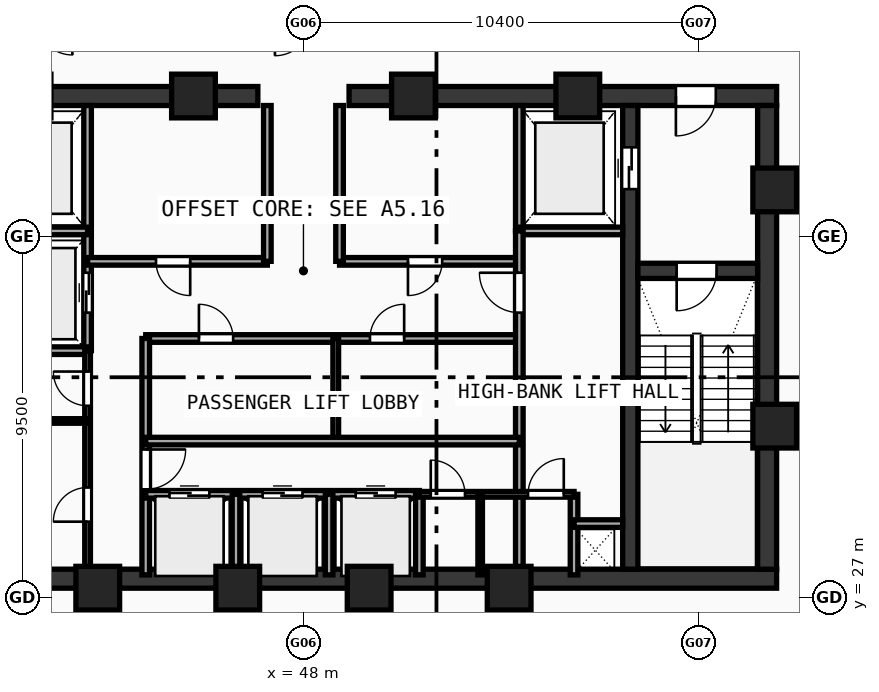
"""IFC4 building model, lengths in metres.
Left out: names, types, materials, properties, quantities, classifications, styles, units other than length and angle.
Written with IfcOpenShell. Run it as: python <this file> out.ifc"""

import sys

from ifc_helpers import new_model, si_unit, direction, frame, frame_2d, origin, origin_with_axes, origin_2d, place, context, subcontext, project, spatial, rectangle, hollow_rectangle, extrude, source, transform, mapped, element, fill, save


model = new_model("IFC4")
c1 = context("Model", 3, precision=1e-05, world=origin(), true_north=direction((0.0, 1.0)))
c2 = subcontext(c1, "Body", "Model", "MODEL_VIEW")
j1 = project(units=[si_unit("LENGTHUNIT", "METRE"), si_unit("PLANEANGLEUNIT", "RADIAN")], contexts=[c1])
p1 = place(None, origin())
s1 = spatial("IfcSite", under=j1, at=p1, CompositionType="ELEMENT")
p2 = place(p1, origin())
s2 = spatial("IfcBuilding", under=s1, at=p2, CompositionType="ELEMENT")
p3 = place(p2, frame((0.0, 0.0, 240.8)))
s3 = spatial("IfcBuildingStorey", under=s2, at=p3, CompositionType="ELEMENT", Elevation=240.8)
p4 = place(p3, frame((35.55, 27.5, 0.0), z_axis=(0.0, 0.0, 1.0), x_axis=(1.0, 0.0, 0.0)))
e1 = element("IfcWall", 1, at=p4, inside=s3, PredefinedType="SHEAR", context=c2, shape_type="SweptSolid", body=[
    extrude(rectangle(XDim=24.9, YDim=0.5, at=frame_2d((12.45, 0.0))), origin(), (0.0, 0.0, 1.0), 3.47),
])
p5 = place(p3, frame((35.55, 40.2, 0.0), z_axis=(0.0, 0.0, 1.0), x_axis=(1.0, 0.0, 0.0)))
e2 = element("IfcWall", 2, at=p5, inside=s3, PredefinedType="SHEAR", context=c2, shape_type="SweptSolid", body=[
    extrude(rectangle(XDim=11.25, YDim=0.5, at=frame_2d((5.625, 0.0))), origin(), (0.0, 0.0, 1.0), 3.47),
])
p6 = place(p5, frame((1.6, 0.0, 0.0)))
e3 = element("IfcOpeningElement", 3, at=p6, cuts=e2, PredefinedType="OPENING", context=c2, shape_type="SweptSolid", body=[
    extrude(rectangle(XDim=1.05, YDim=2.1, at=frame_2d((0.525, 1.05))), frame((0.0, 0.26, 0.0), z_axis=(0.0, -1.0, 0.0), x_axis=(1.0, 0.0, 0.0)), (0.0, 0.0, 1.0), 0.52),
])
p7 = place(p3, frame((49.2, 40.2, 0.0), z_axis=(0.0, 0.0, 1.0), x_axis=(1.0, 0.0, 0.0)))
e4 = element("IfcWall", 4, at=p7, inside=s3, PredefinedType="SHEAR", context=c2, shape_type="SweptSolid", body=[
    extrude(rectangle(XDim=11.25, YDim=0.5, at=frame_2d((5.625, 0.0))), origin(), (0.0, 0.0, 1.0), 3.47),
])
p8 = place(p7, frame((8.6, 0.0, 0.0)))
e5 = element("IfcOpeningElement", 5, at=p8, cuts=e4, PredefinedType="OPENING", context=c2, shape_type="SweptSolid", body=[
    extrude(rectangle(XDim=1.05, YDim=2.1, at=frame_2d((0.525, 1.05))), frame((0.0, 0.26, 0.0), z_axis=(0.0, -1.0, 0.0), x_axis=(1.0, 0.0, 0.0)), (0.0, 0.0, 1.0), 0.52),
])
p9 = place(p3, frame((60.2, 27.75, 0.0), z_axis=(0.0, 0.0, 1.0), x_axis=(0.0, 1.0, 0.0)))
e6 = element("IfcWall", 6, at=p9, inside=s3, PredefinedType="SHEAR", context=c2, shape_type="SweptSolid", body=[
    extrude(rectangle(XDim=12.2, YDim=0.5, at=frame_2d((6.1, 0.0))), origin(), (0.0, 0.0, 1.0), 3.47),
])
p10 = place(p3, frame((56.6, 27.75, 0.0), z_axis=(0.0, 0.0, 1.0), x_axis=(0.0, 1.0, 0.0)))
e7 = element("IfcWall", 7, at=p10, inside=s3, PredefinedType="SHEAR", context=c2, shape_type="SweptSolid", body=[
    extrude(rectangle(XDim=12.2, YDim=0.4, at=frame_2d((6.1, 0.0))), origin(), (0.0, 0.0, 1.0), 3.47),
])
p11 = place(p10, frame((10.0, 0.0, 0.0)))
e8 = element("IfcOpeningElement", 8, at=p11, cuts=e7, PredefinedType="OPENING", context=c2, shape_type="SweptSolid", body=[
    extrude(rectangle(XDim=1.1, YDim=2.1, at=frame_2d((0.55, 1.05))), frame((0.0, 0.21, 0.0), z_axis=(0.0, -1.0, 0.0), x_axis=(1.0, 0.0, 0.0)), (0.0, 0.0, 1.0), 0.42),
])
p12 = place(p3, frame((56.8, 35.6, 0.0), z_axis=(0.0, 0.0, 1.0), x_axis=(1.0, 0.0, 0.0)))
e9 = element("IfcWall", 9, at=p12, inside=s3, PredefinedType="SHEAR", context=c2, shape_type="SweptSolid", body=[
    extrude(rectangle(XDim=3.15, YDim=0.4, at=frame_2d((1.575, 0.0))), origin(), (0.0, 0.0, 1.0), 3.47),
])
p13 = place(p12, frame((1.02, 0.0, 0.0)))
e10 = element("IfcOpeningElement", 10, at=p13, cuts=e9, PredefinedType="OPENING", context=c2, shape_type="SweptSolid", body=[
    extrude(rectangle(XDim=1.05, YDim=2.1, at=frame_2d((0.525, 1.05))), frame((0.0, 0.21, 0.0), z_axis=(0.0, -1.0, 0.0), x_axis=(1.0, 0.0, 0.0)), (0.0, 0.0, 1.0), 0.42),
])
m1 = source(origin(), c2, "Body", "SweptSolid", [
    extrude(hollow_rectangle(XDim=1.15, YDim=1.15, WallThickness=0.048, at=origin_2d()), origin(), (0.0, 0.0, 1.0), 3.73),
])
for number, where, z_axis, x_axis in (
    (11, (42.588, 27.25, -0.26), (0.0, 0.0, 1.0), (1.0, 0.0, 0.0)),
    (12, (46.272, 27.25, -0.26), (0.0, 0.0, 1.0), (1.0, 0.0, 0.0)),
    (13, (49.729, 27.25, -0.26), (0.0, 0.0, 1.0), (1.0, 0.0, 0.0)),
    (14, (53.412, 27.25, -0.26), (0.0, 0.0, 1.0), (1.0, 0.0, 0.0)),
    (15, (60.4, 31.513, -0.26), (0.0, 0.0, 1.0), (1.0, 0.0, 0.0)),
    (16, (60.4, 37.729, -0.26), (0.0, 0.0, 1.0), (1.0, 0.0, 0.0)),
    (17, (55.219, 40.2, -0.26), (0.0, 0.0, 1.0), (1.0, 0.0, 0.0)),
    (18, (50.894, 40.2, -0.26), (0.0, 0.0, 1.0), (1.0, 0.0, 0.0)),
    (19, (45.106, 40.2, -0.26), (0.0, 0.0, 1.0), (1.0, 0.0, 0.0)),
):
    element("IfcColumn", number, at=place(p3, frame(where, z_axis=z_axis, x_axis=x_axis)), inside=s3, PredefinedType="COLUMN", context=c2, shape_type="MappedRepresentation", body=[
        mapped(m1, transform((0.0, 0.0, 0.0), scale=1.0)),
    ])
p14 = place(p3, frame((42.32, 33.5, 0.0), z_axis=(0.0, 0.0, 1.0), x_axis=(0.0, 1.0, 0.0)))
e20 = element("IfcWall", 20, at=p14, inside=s3, PredefinedType="SOLIDWALL", context=c2, shape_type="SweptSolid", body=[
    extrude(rectangle(XDim=6.45, YDim=0.2, at=frame_2d((3.225, 0.0))), origin(), (0.0, 0.0, 1.0), 3.47),
])
p15 = place(p14, frame((1.0, 0.0, 0.0)))
e21 = element("IfcOpeningElement", 21, at=p15, cuts=e20, PredefinedType="OPENING", context=c2, shape_type="SweptSolid", body=[
    extrude(rectangle(XDim=1.05, YDim=2.1, at=frame_2d((0.525, 1.05))), frame((0.0, 0.11, 0.0), z_axis=(0.0, -1.0, 0.0), x_axis=(1.0, 0.0, 0.0)), (0.0, 0.0, 1.0), 0.22),
])
for number, where, z_axis, x_axis in (
    (22, (39.6, 36.65, 0.0), (0.0, 0.0, 1.0), (1.0, 0.0, 0.0)),
    (23, (39.6, 33.5, 0.0), (0.0, 0.0, 1.0), (1.0, 0.0, 0.0)),
):
    element("IfcWall", number, at=place(p3, frame(where, z_axis=z_axis, x_axis=x_axis)), inside=s3, PredefinedType="SOLIDWALL", context=c2, shape_type="SweptSolid", body=[
        extrude(rectangle(XDim=2.72, YDim=0.2, at=frame_2d((1.36, 0.0))), origin(), (0.0, 0.0, 1.0), 3.47),
    ])
p16 = place(p3, frame((53.68, 36.65, 0.0), z_axis=(0.0, 0.0, 1.0), x_axis=(0.0, 1.0, 0.0)))
e24 = element("IfcWall", 24, at=p16, inside=s3, PredefinedType="SOLIDWALL", context=c2, shape_type="SweptSolid", body=[
    extrude(rectangle(XDim=3.3, YDim=0.2, at=frame_2d((1.65, 0.0))), origin(), (0.0, 0.0, 1.0), 3.47),
])
p17 = place(p3, frame((53.68, 36.65, 0.0), z_axis=(0.0, 0.0, 1.0), x_axis=(1.0, 0.0, 0.0)))
e25 = element("IfcWall", 25, at=p17, inside=s3, PredefinedType="SOLIDWALL", context=c2, shape_type="SweptSolid", body=[
    extrude(rectangle(XDim=2.72, YDim=0.2, at=frame_2d((1.36, 0.0))), origin(), (0.0, 0.0, 1.0), 3.47),
])
p18 = place(p3, frame((42.32, 35.85, 0.0), z_axis=(0.0, 0.0, 1.0), x_axis=(1.0, 0.0, 0.0)))
e26 = element("IfcWall", 26, at=p18, inside=s3, PredefinedType="SOLIDWALL", context=c2, shape_type="SweptSolid", body=[
    extrude(rectangle(XDim=4.73, YDim=0.2, at=frame_2d((2.365, 0.0))), origin(), (0.0, 0.0, 1.0), 3.47),
])
p19 = place(p18, frame((1.8, 0.0, 0.0)))
e27 = element("IfcOpeningElement", 27, at=p19, cuts=e26, PredefinedType="OPENING", context=c2, shape_type="SweptSolid", body=[
    extrude(rectangle(XDim=0.9, YDim=2.1, at=frame_2d((0.45, 1.05))), frame((0.0, 0.11, 0.0), z_axis=(0.0, -1.0, 0.0), x_axis=(1.0, 0.0, 0.0)), (0.0, 0.0, 1.0), 0.22),
])
p20 = place(p3, frame((48.95, 35.85, 0.0), z_axis=(0.0, 0.0, 1.0), x_axis=(1.0, 0.0, 0.0)))
e28 = element("IfcWall", 28, at=p20, inside=s3, PredefinedType="SOLIDWALL", context=c2, shape_type="SweptSolid", body=[
    extrude(rectangle(XDim=4.73, YDim=0.2, at=frame_2d((2.365, 0.0))), origin(), (0.0, 0.0, 1.0), 3.47),
])
p21 = place(p20, frame((1.8, 0.0, 0.0)))
e29 = element("IfcOpeningElement", 29, at=p21, cuts=e28, PredefinedType="OPENING", context=c2, shape_type="SweptSolid", body=[
    extrude(rectangle(XDim=0.9, YDim=2.1, at=frame_2d((0.45, 1.05))), frame((0.0, 0.11, 0.0), z_axis=(0.0, -1.0, 0.0), x_axis=(1.0, 0.0, 0.0)), (0.0, 0.0, 1.0), 0.22),
])
for number, where, z_axis, x_axis in (
    (30, (47.05, 35.85, 0.0), (0.0, 0.0, 1.0), (0.0, 1.0, 0.0)),
    (31, (48.95, 35.85, 0.0), (0.0, 0.0, 1.0), (0.0, 1.0, 0.0)),
):
    element("IfcWall", number, at=place(p3, frame(where, z_axis=z_axis, x_axis=x_axis)), inside=s3, PredefinedType="SOLIDWALL", context=c2, shape_type="SweptSolid", body=[
        extrude(rectangle(XDim=4.1, YDim=0.2, at=frame_2d((2.05, 0.0))), origin(), (0.0, 0.0, 1.0), 3.47),
    ])
p22 = place(p3, frame((43.85, 33.82, 0.0), z_axis=(0.0, 0.0, 1.0), x_axis=(1.0, 0.0, 0.0)))
e32 = element("IfcWall", 32, at=p22, inside=s3, PredefinedType="SOLIDWALL", context=c2, shape_type="SweptSolid", body=[
    extrude(rectangle(XDim=9.83, YDim=0.2, at=frame_2d((4.915, 0.0))), origin(), (0.0, 0.0, 1.0), 3.47),
])
p23 = place(p22, frame((1.4, 0.0, 0.0)))
e33 = element("IfcOpeningElement", 33, at=p23, cuts=e32, PredefinedType="OPENING", context=c2, shape_type="SweptSolid", body=[
    extrude(rectangle(XDim=0.9, YDim=2.1, at=frame_2d((0.45, 1.05))), frame((0.0, 0.11, 0.0), z_axis=(0.0, -1.0, 0.0), x_axis=(1.0, 0.0, 0.0)), (0.0, 0.0, 1.0), 0.22),
])
p24 = place(p22, frame((5.9, 0.0, 0.0)))
e34 = element("IfcOpeningElement", 34, at=p24, cuts=e32, PredefinedType="OPENING", context=c2, shape_type="SweptSolid", body=[
    extrude(rectangle(XDim=0.9, YDim=2.1, at=frame_2d((0.45, 1.05))), frame((0.0, 0.11, 0.0), z_axis=(0.0, -1.0, 0.0), x_axis=(1.0, 0.0, 0.0)), (0.0, 0.0, 1.0), 0.22),
])
p25 = place(p3, frame((43.85, 27.6, 0.0), z_axis=(0.0, 0.0, 1.0), x_axis=(0.0, 1.0, 0.0)))
e35 = element("IfcWall", 35, at=p25, inside=s3, PredefinedType="SOLIDWALL", context=c2, shape_type="SweptSolid", body=[
    extrude(rectangle(XDim=6.22, YDim=0.2, at=frame_2d((3.11, 0.0))), origin(), (0.0, 0.0, 1.0), 3.47),
])
p26 = place(p25, frame((2.25, 0.0, 0.0)))
e36 = element("IfcOpeningElement", 36, at=p26, cuts=e35, PredefinedType="OPENING", context=c2, shape_type="SweptSolid", body=[
    extrude(rectangle(XDim=1.05, YDim=2.1, at=frame_2d((0.525, 1.05))), frame((0.0, 0.11, 0.0), z_axis=(0.0, -1.0, 0.0), x_axis=(1.0, 0.0, 0.0)), (0.0, 0.0, 1.0), 0.22),
])
p27 = place(p3, frame((53.68, 27.6, 0.0), z_axis=(0.0, 0.0, 1.0), x_axis=(0.0, 1.0, 0.0)))
e37 = element("IfcWall", 37, at=p27, inside=s3, PredefinedType="SOLIDWALL", context=c2, shape_type="SweptSolid", body=[
    extrude(rectangle(XDim=9.05, YDim=0.2, at=frame_2d((4.525, 0.0))), origin(), (0.0, 0.0, 1.0), 3.47),
])
p28 = place(p27, frame((6.9, 0.0, 0.0)))
e38 = element("IfcOpeningElement", 38, at=p28, cuts=e37, PredefinedType="OPENING", context=c2, shape_type="SweptSolid", body=[
    extrude(rectangle(XDim=1.05, YDim=2.1, at=frame_2d((0.525, 1.05))), frame((0.0, 0.11, 0.0), z_axis=(0.0, -1.0, 0.0), x_axis=(1.0, 0.0, 0.0)), (0.0, 0.0, 1.0), 0.22),
])
p29 = place(p3, frame((48.85, 31.12, 0.0), z_axis=(0.0, 0.0, 1.0), x_axis=(0.0, 1.0, 0.0)))
e39 = element("IfcWall", 39, at=p29, inside=s3, PredefinedType="PARTITIONING", context=c2, shape_type="SweptSolid", body=[
    extrude(rectangle(XDim=2.7, YDim=0.15, at=frame_2d((1.35, 0.0))), origin(), (0.0, 0.0, 1.0), 3.47),
])
p30 = place(p3, frame((43.85, 29.72, 0.0), z_axis=(0.0, 0.0, 1.0), x_axis=(1.0, 0.0, 0.0)))
e40 = element("IfcWall", 40, at=p30, inside=s3, PredefinedType="SOLIDWALL", context=c2, shape_type="SweptSolid", body=[
    extrude(rectangle(XDim=7.2, YDim=0.2, at=frame_2d((3.6, 0.0))), origin(), (0.0, 0.0, 1.0), 3.47),
])
p31 = place(p30, frame((0.625, 0.0, 0.0)))
e41 = element("IfcOpeningElement", 41, at=p31, cuts=e40, PredefinedType="OPENING", context=c2, shape_type="SweptSolid", body=[
    extrude(rectangle(XDim=1.05, YDim=2.1, at=frame_2d((0.525, 1.05))), frame((0.0, 0.11, 0.0), z_axis=(0.0, -1.0, 0.0), x_axis=(1.0, 0.0, 0.0)), (0.0, 0.0, 1.0), 0.22),
])
p32 = place(p30, frame((3.075, 0.0, 0.0)))
e42 = element("IfcOpeningElement", 42, at=p32, cuts=e40, PredefinedType="OPENING", context=c2, shape_type="SweptSolid", body=[
    extrude(rectangle(XDim=1.05, YDim=2.1, at=frame_2d((0.525, 1.05))), frame((0.0, 0.11, 0.0), z_axis=(0.0, -1.0, 0.0), x_axis=(1.0, 0.0, 0.0)), (0.0, 0.0, 1.0), 0.22),
])
p33 = place(p30, frame((5.525, 0.0, 0.0)))
e43 = element("IfcOpeningElement", 43, at=p33, cuts=e40, PredefinedType="OPENING", context=c2, shape_type="SweptSolid", body=[
    extrude(rectangle(XDim=1.05, YDim=2.1, at=frame_2d((0.525, 1.05))), frame((0.0, 0.11, 0.0), z_axis=(0.0, -1.0, 0.0), x_axis=(1.0, 0.0, 0.0)), (0.0, 0.0, 1.0), 0.22),
])
p34 = place(p3, frame((51.05, 27.6, 0.0), z_axis=(0.0, 0.0, 1.0), x_axis=(0.0, 1.0, 0.0)))
e44 = element("IfcWall", 44, at=p34, inside=s3, PredefinedType="SOLIDWALL", context=c2, shape_type="SweptSolid", body=[
    extrude(rectangle(XDim=2.12, YDim=0.2, at=frame_2d((1.06, 0.0))), origin(), (0.0, 0.0, 1.0), 3.47),
])
p35 = place(p3, frame((43.85, 31.12, 0.0), z_axis=(0.0, 0.0, 1.0), x_axis=(1.0, 0.0, 0.0)))
e45 = element("IfcWall", 45, at=p35, inside=s3, PredefinedType="SOLIDWALL", context=c2, shape_type="SweptSolid", body=[
    extrude(rectangle(XDim=9.83, YDim=0.2, at=frame_2d((4.915, 0.0))), origin(), (0.0, 0.0, 1.0), 3.47),
])
for number, where, z_axis, x_axis in (
    (46, (46.225, 27.6, 0.0), (0.0, 0.0, 1.0), (0.0, 1.0, 0.0)),
    (47, (48.675, 27.6, 0.0), (0.0, 0.0, 1.0), (0.0, 1.0, 0.0)),
    (48, (55.12, 27.6, 0.0), (0.0, 0.0, 1.0), (0.0, 1.0, 0.0)),
):
    element("IfcWall", number, at=place(p3, frame(where, z_axis=z_axis, x_axis=x_axis)), inside=s3, PredefinedType="SOLIDWALL", context=c2, shape_type="SweptSolid", body=[
        extrude(rectangle(XDim=2.12, YDim=0.2, at=frame_2d((1.06, 0.0))), origin(), (0.0, 0.0, 1.0), 3.47),
    ])
p36 = place(p3, frame((55.12, 28.95, 0.0), z_axis=(0.0, 0.0, 1.0), x_axis=(1.0, 0.0, 0.0)))
e49 = element("IfcWall", 49, at=p36, inside=s3, PredefinedType="SOLIDWALL", context=c2, shape_type="SweptSolid", body=[
    extrude(rectangle(XDim=1.28, YDim=0.2, at=frame_2d((0.64, 0.0))), origin(), (0.0, 0.0, 1.0), 3.47),
])
p37 = place(p3, frame((42.32, 27.6, 0.0), z_axis=(0.0, 0.0, 1.0), x_axis=(0.0, 1.0, 0.0)))
e50 = element("IfcWall", 50, at=p37, inside=s3, PredefinedType="PARTITIONING", context=c2, shape_type="SweptSolid", body=[
    extrude(rectangle(XDim=5.9, YDim=0.15, at=frame_2d((2.95, 0.0))), origin(), (0.0, 0.0, 1.0), 3.47),
])
p38 = place(p37, frame((1.4, 0.0, 0.0)))
e51 = element("IfcOpeningElement", 51, at=p38, cuts=e50, PredefinedType="OPENING", context=c2, shape_type="SweptSolid", body=[
    extrude(rectangle(XDim=0.9, YDim=2.1, at=frame_2d((0.45, 1.05))), frame((0.0, 0.085, 0.0), z_axis=(0.0, -1.0, 0.0), x_axis=(1.0, 0.0, 0.0)), (0.0, 0.0, 1.0), 0.17),
])
p39 = place(p37, frame((4.45, 0.0, 0.0)))
e52 = element("IfcOpeningElement", 52, at=p39, cuts=e50, PredefinedType="OPENING", context=c2, shape_type="SweptSolid", body=[
    extrude(rectangle(XDim=0.9, YDim=2.1, at=frame_2d((0.45, 1.05))), frame((0.0, 0.085, 0.0), z_axis=(0.0, -1.0, 0.0), x_axis=(1.0, 0.0, 0.0)), (0.0, 0.0, 1.0), 0.17),
])
p40 = place(p3, frame((51.05, 29.72, 0.0), z_axis=(0.0, 0.0, 1.0), x_axis=(1.0, 0.0, 0.0)))
e53 = element("IfcWall", 53, at=p40, inside=s3, PredefinedType="PARTITIONING", context=c2, shape_type="SweptSolid", body=[
    extrude(rectangle(XDim=4.07, YDim=0.15, at=frame_2d((2.035, 0.0))), origin(), (0.0, 0.0, 1.0), 3.47),
])
p41 = place(p40, frame((0.3, 0.0, 0.0)))
e54 = element("IfcOpeningElement", 54, at=p41, cuts=e53, PredefinedType="OPENING", context=c2, shape_type="SweptSolid", body=[
    extrude(rectangle(XDim=0.9, YDim=2.1, at=frame_2d((0.45, 1.05))), frame((0.0, 0.085, 0.0), z_axis=(0.0, -1.0, 0.0), x_axis=(1.0, 0.0, 0.0)), (0.0, 0.0, 1.0), 0.17),
])
p42 = place(p40, frame((2.86, 0.0, 0.0)))
e55 = element("IfcOpeningElement", 55, at=p42, cuts=e53, PredefinedType="OPENING", context=c2, shape_type="SweptSolid", body=[
    extrude(rectangle(XDim=0.94, YDim=2.1, at=frame_2d((0.47, 1.05))), frame((0.0, 0.085, 0.0), z_axis=(0.0, -1.0, 0.0), x_axis=(1.0, 0.0, 0.0)), (0.0, 0.0, 1.0), 0.17),
])
p43 = place(p3, frame((39.6, 31.65, 0.0), z_axis=(0.0, 0.0, 1.0), x_axis=(1.0, 0.0, 0.0)))
e56 = element("IfcWall", 56, at=p43, inside=s3, PredefinedType="PARTITIONING", context=c2, shape_type="SweptSolid", body=[
    extrude(rectangle(XDim=2.72, YDim=0.12, at=frame_2d((1.36, 0.0))), origin(), (0.0, 0.0, 1.0), 3.47),
])
p44 = place(p3, frame((52.65, 27.6, 0.0), z_axis=(0.0, 0.0, 1.0), x_axis=(0.0, 1.0, 0.0)))
e57 = element("IfcWall", 57, at=p44, inside=s3, PredefinedType="PARTITIONING", context=c2, shape_type="SweptSolid", body=[
    extrude(rectangle(XDim=2.12, YDim=0.12, at=frame_2d((1.06, 0.0))), origin(), (0.0, 0.0, 1.0), 3.47),
])
m2 = source(origin(), c2, "Body", "SweptSolid", [
    extrude(rectangle(XDim=1.05, YDim=2.1, at=frame_2d((0.525, 1.05))), frame((0.0, 0.025, 0.0), z_axis=(0.0, -1.0, 0.0), x_axis=(1.0, 0.0, 0.0)), (0.0, 0.0, 1.0), 0.05),
])
p45 = place(p13, frame((1.05, 0.0, 0.0), z_axis=(0.0, 0.0, 1.0), x_axis=(-1.0, 0.0, 0.0)))
e58 = element("IfcDoor", 58, at=p45, inside=s3, OperationType="SINGLE_SWING_RIGHT", PredefinedType="DOOR", context=c2, shape_type="MappedRepresentation", body=[
    mapped(m2, transform((0.0, 0.0, 0.0), scale=1.0)),
])
fill(e10, e58)
p46 = place(p8, frame((1.05, 0.0, 0.0), z_axis=(0.0, 0.0, 1.0), x_axis=(-1.0, 0.0, 0.0)))
e59 = element("IfcDoor", 59, at=p46, inside=s3, OperationType="SINGLE_SWING_RIGHT", PredefinedType="DOOR", context=c2, shape_type="MappedRepresentation", body=[
    mapped(m2, transform((0.0, 0.0, 0.0), scale=1.0)),
])
fill(e5, e59)
m3 = source(origin(), c2, "Body", "SweptSolid", [
    extrude(rectangle(XDim=1.1, YDim=2.1, at=frame_2d((0.55, 1.05))), frame((0.0, 0.025, 0.0), z_axis=(0.0, -1.0, 0.0), x_axis=(1.0, 0.0, 0.0)), (0.0, 0.0, 1.0), 0.05),
])
p47 = place(p11, origin_with_axes())
e60 = element("IfcDoor", 60, at=p47, inside=s3, OperationType="DOUBLE_DOOR_SLIDING", PredefinedType="DOOR", context=c2, shape_type="MappedRepresentation", body=[
    mapped(m3, transform((0.0, 0.0, 0.0), scale=1.0)),
])
fill(e8, e60)
p48 = place(p15, origin_with_axes())
e61 = element("IfcDoor", 61, at=p48, inside=s3, OperationType="DOUBLE_DOOR_SLIDING", PredefinedType="DOOR", context=c2, shape_type="MappedRepresentation", body=[
    mapped(m2, transform((0.0, 0.0, 0.0), scale=1.0)),
])
fill(e21, e61)
m4 = source(origin(), c2, "Body", "SweptSolid", [
    extrude(rectangle(XDim=0.9, YDim=2.1, at=frame_2d((0.45, 1.05))), frame((0.0, 0.025, 0.0), z_axis=(0.0, -1.0, 0.0), x_axis=(1.0, 0.0, 0.0)), (0.0, 0.0, 1.0), 0.05),
])
p49 = place(p19, frame((0.9, 0.0, 0.0), z_axis=(0.0, 0.0, 1.0), x_axis=(-1.0, 0.0, 0.0)))
e62 = element("IfcDoor", 62, at=p49, inside=s3, OperationType="SINGLE_SWING_LEFT", PredefinedType="DOOR", context=c2, shape_type="MappedRepresentation", body=[
    mapped(m4, transform((0.0, 0.0, 0.0), scale=1.0)),
])
fill(e27, e62)
p50 = place(p21, frame((0.9, 0.0, 0.0), z_axis=(0.0, 0.0, 1.0), x_axis=(-1.0, 0.0, 0.0)))
e63 = element("IfcDoor", 63, at=p50, inside=s3, OperationType="SINGLE_SWING_RIGHT", PredefinedType="DOOR", context=c2, shape_type="MappedRepresentation", body=[
    mapped(m4, transform((0.0, 0.0, 0.0), scale=1.0)),
])
fill(e29, e63)
p51 = place(p23, origin_with_axes())
e64 = element("IfcDoor", 64, at=p51, inside=s3, OperationType="SINGLE_SWING_LEFT", PredefinedType="DOOR", context=c2, shape_type="MappedRepresentation", body=[
    mapped(m4, transform((0.0, 0.0, 0.0), scale=1.0)),
])
fill(e33, e64)
p52 = place(p24, origin_with_axes())
e65 = element("IfcDoor", 65, at=p52, inside=s3, OperationType="SINGLE_SWING_RIGHT", PredefinedType="DOOR", context=c2, shape_type="MappedRepresentation", body=[
    mapped(m4, transform((0.0, 0.0, 0.0), scale=1.0)),
])
fill(e34, e65)
p53 = place(p26, frame((1.05, 0.0, 0.0), z_axis=(0.0, 0.0, 1.0), x_axis=(-1.0, 0.0, 0.0)))
e66 = element("IfcDoor", 66, at=p53, inside=s3, OperationType="SINGLE_SWING_LEFT", PredefinedType="DOOR", context=c2, shape_type="MappedRepresentation", body=[
    mapped(m2, transform((0.0, 0.0, 0.0), scale=1.0)),
])
fill(e36, e66)
p54 = place(p28, origin_with_axes())
e67 = element("IfcDoor", 67, at=p54, inside=s3, OperationType="SINGLE_SWING_RIGHT", PredefinedType="DOOR", context=c2, shape_type="MappedRepresentation", body=[
    mapped(m2, transform((0.0, 0.0, 0.0), scale=1.0)),
])
fill(e38, e67)
p55 = place(p31, origin_with_axes())
e68 = element("IfcDoor", 68, at=p55, inside=s3, OperationType="DOUBLE_DOOR_SLIDING", PredefinedType="DOOR", context=c2, shape_type="MappedRepresentation", body=[
    mapped(m2, transform((0.0, 0.0, 0.0), scale=1.0)),
])
fill(e41, e68)
p56 = place(p32, origin_with_axes())
e69 = element("IfcDoor", 69, at=p56, inside=s3, OperationType="DOUBLE_DOOR_SLIDING", PredefinedType="DOOR", context=c2, shape_type="MappedRepresentation", body=[
    mapped(m2, transform((0.0, 0.0, 0.0), scale=1.0)),
])
fill(e42, e69)
p57 = place(p33, origin_with_axes())
e70 = element("IfcDoor", 70, at=p57, inside=s3, OperationType="DOUBLE_DOOR_SLIDING", PredefinedType="DOOR", context=c2, shape_type="MappedRepresentation", body=[
    mapped(m2, transform((0.0, 0.0, 0.0), scale=1.0)),
])
fill(e43, e70)
p58 = place(p38, origin_with_axes())
e71 = element("IfcDoor", 71, at=p58, inside=s3, OperationType="SINGLE_SWING_LEFT", PredefinedType="DOOR", context=c2, shape_type="MappedRepresentation", body=[
    mapped(m4, transform((0.0, 0.0, 0.0), scale=1.0)),
])
fill(e51, e71)
p59 = place(p39, origin_with_axes())
e72 = element("IfcDoor", 72, at=p59, inside=s3, OperationType="SINGLE_SWING_RIGHT", PredefinedType="DOOR", context=c2, shape_type="MappedRepresentation", body=[
    mapped(m4, transform((0.0, 0.0, 0.0), scale=1.0)),
])
fill(e52, e72)
p60 = place(p41, origin_with_axes())
e73 = element("IfcDoor", 73, at=p60, inside=s3, OperationType="SINGLE_SWING_LEFT", PredefinedType="DOOR", context=c2, shape_type="MappedRepresentation", body=[
    mapped(m4, transform((0.0, 0.0, 0.0), scale=1.0)),
])
fill(e54, e73)
m5 = source(origin(), c2, "Body", "SweptSolid", [
    extrude(rectangle(XDim=0.94, YDim=2.1, at=frame_2d((0.47, 1.05))), frame((0.0, 0.025, 0.0), z_axis=(0.0, -1.0, 0.0), x_axis=(1.0, 0.0, 0.0)), (0.0, 0.0, 1.0), 0.05),
])
p61 = place(p42, origin_with_axes())
e74 = element("IfcDoor", 74, at=p61, inside=s3, OperationType="SINGLE_SWING_RIGHT", PredefinedType="DOOR", context=c2, shape_type="MappedRepresentation", body=[
    mapped(m5, transform((0.0, 0.0, 0.0), scale=1.0)),
])
fill(e55, e74)
save(model, sys.argv[1])
